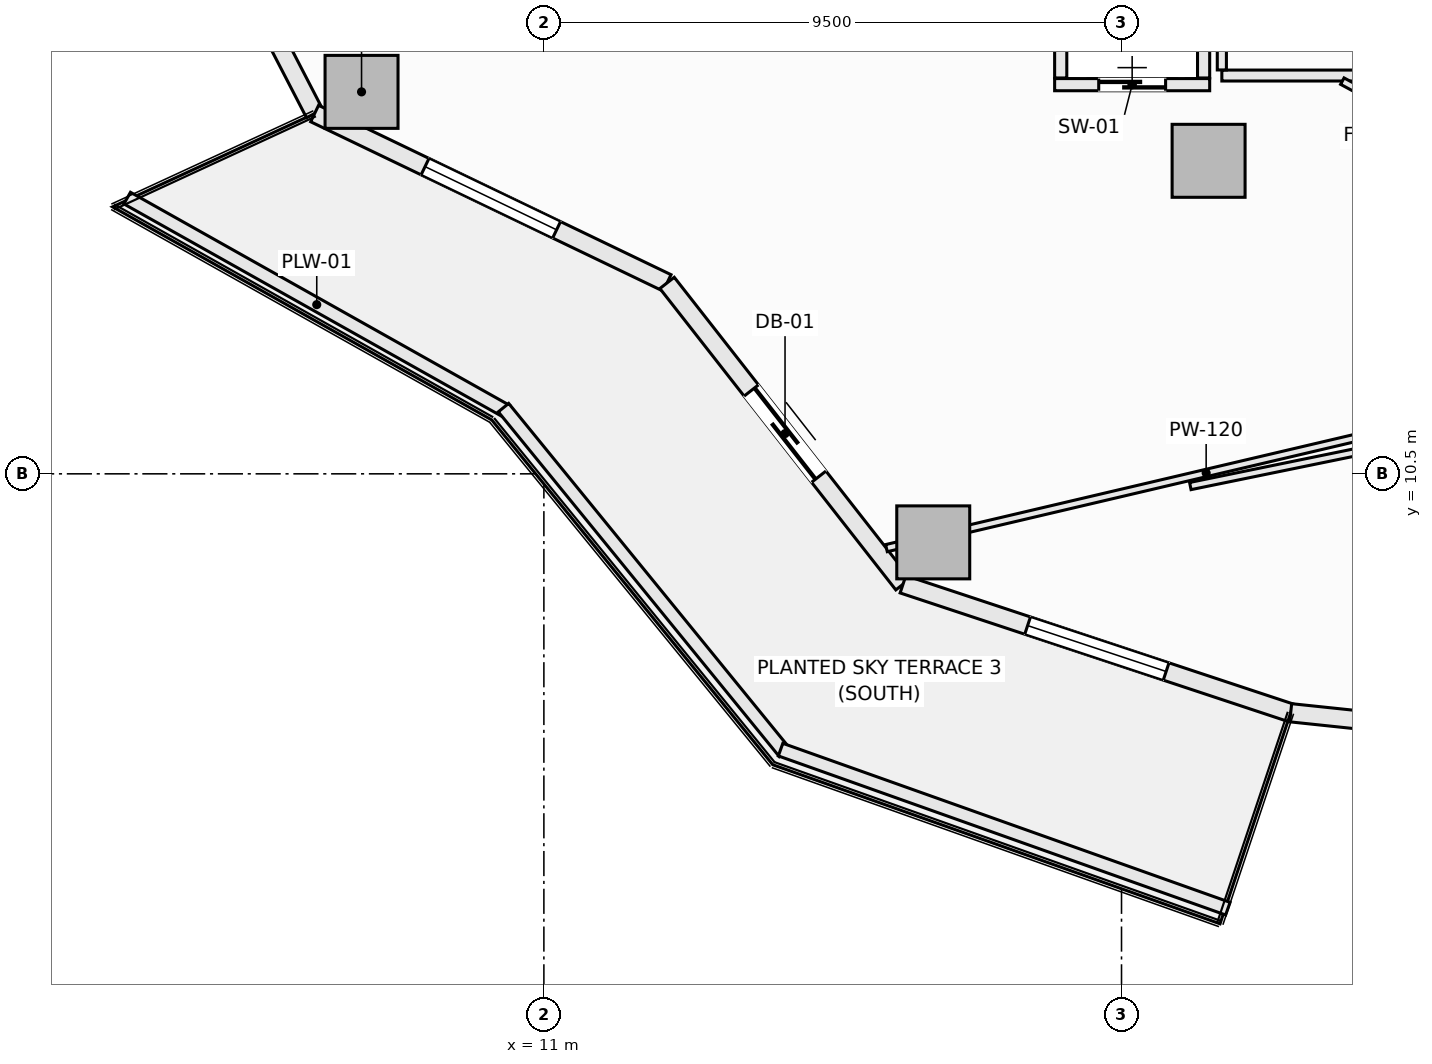
"""IFC4 building model, lengths in metres.
Left out: names, types, materials, properties, quantities, classifications, styles, units other than length and angle.
Written with IfcOpenShell. Run it as: python <this file> out.ifc"""

import sys

from ifc_helpers import new_model, si_unit, direction, frame, frame_2d, origin, origin_2d, place, context, subcontext, project, spatial, rectangle, extrude, element, fill, save


model = new_model("IFC4")
c1 = context("Model", 3, precision=1e-05, world=origin(), true_north=direction((0.0, 1.0)))
c2 = subcontext(c1, "Body", "Model", "MODEL_VIEW")
j1 = project(units=[si_unit("LENGTHUNIT", "METRE"), si_unit("PLANEANGLEUNIT", "RADIAN")], contexts=[c1])
p1 = place(None, origin())
s1 = spatial("IfcSite", under=j1, at=p1, CompositionType="ELEMENT")
p2 = place(p1, origin())
s2 = spatial("IfcBuilding", under=s1, at=p2, CompositionType="ELEMENT")
p3 = place(p2, frame((0.0, 0.0, 91.95)))
s3 = spatial("IfcBuildingStorey", under=s2, at=p3, CompositionType="ELEMENT", Elevation=91.95)
for number, where, z_axis, x_axis in (
    (1, (8.001, 16.781, -0.28), (0.0, 0.0, 1.0), (1.0, 0.0, 0.0)),
    (2, (17.404, 9.373, -0.28), (0.0, 0.0, 1.0), (1.0, 0.0, 0.0)),
    (3, (21.932, 15.648, -0.28), (0.0, 0.0, 1.0), (1.0, 0.0, 0.0)),
):
    element("IfcColumn", number, at=place(p3, frame(where, z_axis=z_axis, x_axis=x_axis)), inside=s3, PredefinedType="COLUMN", context=c2, shape_type="SweptSolid", body=[
        extrude(rectangle(XDim=1.2, YDim=1.2, at=origin_2d()), origin(), (0.0, 0.0, 1.0), 3.81),
    ])
p4 = place(p3, frame((4.588, 21.526, 0.0), z_axis=(0.0, 0.0, 1.0), x_axis=(0.459800981414, -0.888021991558, 0.0)))
e4 = element("IfcWall", 4, at=p4, inside=s3, PredefinedType="SOLIDWALL", context=c2, shape_type="SweptSolid", body=[
    extrude(rectangle(XDim=5.744, YDim=0.3, at=frame_2d((2.872, 0.0))), origin(), (0.0, 0.0, 1.0), 3.053),
])
p5 = place(p4, frame((1.672, 0.0, 0.85)))
e5 = element("IfcOpeningElement", 5, at=p5, cuts=e4, PredefinedType="OPENING", context=c2, shape_type="SweptSolid", body=[
    extrude(rectangle(XDim=2.4, YDim=1.9, at=frame_2d((1.2, 0.95))), frame((0.0, 0.16, 0.0), z_axis=(0.0, -1.0, 0.0), x_axis=(1.0, 0.0, 0.0)), (0.0, 0.0, 1.0), 0.32),
])
p6 = place(p3, frame((7.229, 16.425, 0.0), z_axis=(0.0, 0.0, 1.0), x_axis=(0.901354747727, -0.433081538224, 0.0)))
e6 = element("IfcWall", 6, at=p6, inside=s3, PredefinedType="SOLIDWALL", context=c2, shape_type="SweptSolid", body=[
    extrude(rectangle(XDim=6.431, YDim=0.3, at=frame_2d((3.215, 0.0))), origin(), (0.0, 0.0, 1.0), 3.053),
])
p7 = place(p6, frame((2.015, 0.0, 0.85)))
e7 = element("IfcOpeningElement", 7, at=p7, cuts=e6, PredefinedType="OPENING", context=c2, shape_type="SweptSolid", body=[
    extrude(rectangle(XDim=2.4, YDim=1.9, at=frame_2d((1.2, 0.95))), frame((0.0, 0.16, 0.0), z_axis=(0.0, -1.0, 0.0), x_axis=(1.0, 0.0, 0.0)), (0.0, 0.0, 1.0), 0.32),
])
p8 = place(p3, frame((13.026, 13.64, 0.0), z_axis=(0.0, 0.0, 1.0), x_axis=(0.616434798832, -0.78740595552, 0.0)))
e8 = element("IfcWall", 8, at=p8, inside=s3, PredefinedType="SOLIDWALL", context=c2, shape_type="SweptSolid", body=[
    extrude(rectangle(XDim=6.294, YDim=0.3, at=frame_2d((3.147, 0.0))), origin(), (0.0, 0.0, 1.0), 3.053),
])
p9 = place(p8, frame((2.247, 0.0, 0.0)))
e9 = element("IfcOpeningElement", 9, at=p9, cuts=e8, PredefinedType="OPENING", context=c2, shape_type="SweptSolid", body=[
    extrude(rectangle(XDim=1.8, YDim=2.25, at=frame_2d((0.9, 1.125))), frame((0.0, 0.16, 0.0), z_axis=(0.0, -1.0, 0.0), x_axis=(1.0, 0.0, 0.0)), (0.0, 0.0, 1.0), 0.32),
])
p10 = place(p3, frame((16.906, 8.684, 0.0), z_axis=(0.0, 0.0, 1.0), x_axis=(0.949245153629, -0.314537181127, 0.0)))
e10 = element("IfcWall", 10, at=p10, inside=s3, PredefinedType="SOLIDWALL", context=c2, shape_type="SweptSolid", body=[
    extrude(rectangle(XDim=6.717, YDim=0.3, at=frame_2d((3.358, 0.0))), origin(), (0.0, 0.0, 1.0), 3.053),
])
p11 = place(p10, frame((2.159, 0.0, 0.85)))
e11 = element("IfcOpeningElement", 11, at=p11, cuts=e10, PredefinedType="OPENING", context=c2, shape_type="SweptSolid", body=[
    extrude(rectangle(XDim=2.4, YDim=1.9, at=frame_2d((1.2, 0.95))), frame((0.0, 0.16, 0.0), z_axis=(0.0, -1.0, 0.0), x_axis=(1.0, 0.0, 0.0)), (0.0, 0.0, 1.0), 0.32),
])
p12 = place(p3, frame((23.282, 6.571, 0.0), z_axis=(0.0, 0.0, 1.0), x_axis=(0.994498840295, -0.104747585419, 0.0)))
e12 = element("IfcWall", 12, at=p12, inside=s3, PredefinedType="SOLIDWALL", context=c2, shape_type="SweptSolid", body=[
    extrude(rectangle(XDim=6.88, YDim=0.3, at=frame_2d((3.44, 0.0))), origin(), (0.0, 0.0, 1.0), 3.053),
])
p13 = place(p12, frame((2.24, 0.0, 0.85)))
e13 = element("IfcOpeningElement", 13, at=p13, cuts=e12, PredefinedType="OPENING", context=c2, shape_type="SweptSolid", body=[
    extrude(rectangle(XDim=2.4, YDim=1.9, at=frame_2d((1.2, 0.95))), frame((0.0, 0.16, 0.0), z_axis=(0.0, -1.0, 0.0), x_axis=(1.0, 0.0, 0.0)), (0.0, 0.0, 1.0), 0.32),
])
p14 = place(p3, frame((4.147, 15.034, 0.0), z_axis=(0.0, 0.0, 1.0), x_axis=(0.871775109335, -0.489906275468, 0.0)))
e14 = element("IfcWall", 14, at=p14, inside=s3, PredefinedType="PARAPET", context=c2, shape_type="SweptSolid", body=[
    extrude(rectangle(XDim=7.152, YDim=0.22, at=frame_2d((3.576, 0.0))), origin(), (0.0, 0.0, 1.0), 0.52),
])
p15 = place(p3, frame((10.336, 11.589, 0.0), z_axis=(0.0, 0.0, 1.0), x_axis=(0.631819273026, -0.775115737315, 0.0)))
e15 = element("IfcWall", 15, at=p15, inside=s3, PredefinedType="PARAPET", context=c2, shape_type="SweptSolid", body=[
    extrude(rectangle(XDim=7.316, YDim=0.22, at=frame_2d((3.658, 0.0))), origin(), (0.0, 0.0, 1.0), 0.52),
])
p16 = place(p3, frame((14.893, 5.965, 0.0), z_axis=(0.0, 0.0, 1.0), x_axis=(0.942203722205, -0.335040513764, 0.0)))
e16 = element("IfcWall", 16, at=p16, inside=s3, PredefinedType="PARAPET", context=c2, shape_type="SweptSolid", body=[
    extrude(rectangle(XDim=7.807, YDim=0.22, at=frame_2d((3.904, 0.0))), origin(), (0.0, 0.0, 1.0), 0.52),
])
p17 = place(p3, frame((19.4, 16.9, 0.0), z_axis=(0.0, 0.0, 1.0), x_axis=(1.0, 0.0, 0.0)))
e17 = element("IfcWall", 17, at=p17, inside=s3, PredefinedType="SOLIDWALL", context=c2, shape_type="SweptSolid", body=[
    extrude(rectangle(XDim=2.55, YDim=0.2, at=frame_2d((1.275, 0.0))), origin(), (0.0, 0.0, 1.0), 3.53),
])
p18 = place(p17, frame((0.725, 0.0, 0.0)))
e18 = element("IfcOpeningElement", 18, at=p18, cuts=e17, PredefinedType="OPENING", context=c2, shape_type="SweptSolid", body=[
    extrude(rectangle(XDim=1.1, YDim=2.2, at=frame_2d((0.55, 1.1))), frame((0.0, 0.11, 0.0), z_axis=(0.0, -1.0, 0.0), x_axis=(1.0, 0.0, 0.0)), (0.0, 0.0, 1.0), 0.22),
])
for number, where, z_axis, x_axis in (
    (19, (19.5, 17.01, 0.0), (0.0, 0.0, 1.0), (0.0, 1.0, 0.0)),
    (20, (21.85, 17.01, 0.0), (0.0, 0.0, 1.0), (0.0, 1.0, 0.0)),
):
    element("IfcWall", number, at=place(p3, frame(where, z_axis=z_axis, x_axis=x_axis)), inside=s3, PredefinedType="SOLIDWALL", context=c2, shape_type="SweptSolid", body=[
        extrude(rectangle(XDim=2.53, YDim=0.2, at=frame_2d((1.265, 0.0))), origin(), (0.0, 0.0, 1.0), 3.53),
    ])
p19 = place(p3, frame((22.15, 17.05, 0.0), z_axis=(0.0, 0.0, 1.0), x_axis=(1.0, 0.0, 0.0)))
e21 = element("IfcWall", 21, at=p19, inside=s3, PredefinedType="SOLIDWALL", context=c2, shape_type="SweptSolid", body=[
    extrude(rectangle(XDim=5.0, YDim=0.18, at=frame_2d((2.5, 0.0))), origin(), (0.0, 0.0, 1.0), 3.53),
])
p20 = place(p3, frame((22.15, 17.142, 0.0), z_axis=(0.0, 0.0, 1.0), x_axis=(0.0, 1.0, 0.0)))
e22 = element("IfcWall", 22, at=p20, inside=s3, PredefinedType="PARTITIONING", context=c2, shape_type="SweptSolid", body=[
    extrude(rectangle(XDim=2.506, YDim=0.15, at=frame_2d((1.253, 0.0))), origin(), (0.0, 0.0, 1.0), 3.53),
])
p21 = place(p3, frame((24.132, 16.958, 0.0), z_axis=(0.0, 0.0, 1.0), x_axis=(0.879874093471, -0.475206880882, 0.0)))
e23 = element("IfcWall", 23, at=p21, inside=s3, PredefinedType="PARTITIONING", context=c2, shape_type="SweptSolid", body=[
    extrude(rectangle(XDim=3.326, YDim=0.12, at=frame_2d((1.663, 0.0))), origin(), (0.0, 0.0, 1.0), 3.53),
])
p22 = place(p3, frame((16.634, 9.278, 0.0), z_axis=(0.0, 0.0, 1.0), x_axis=(0.973467827541, 0.228823925195, 0.0)))
e24 = element("IfcWall", 24, at=p22, inside=s3, PredefinedType="PARTITIONING", context=c2, shape_type="SweptSolid", body=[
    extrude(rectangle(XDim=10.803, YDim=0.12, at=frame_2d((5.401, 0.0))), origin(), (0.0, 0.0, 1.0), 3.053),
])
p23 = place(p3, frame((21.632, 10.299, 0.0), z_axis=(0.0, 0.0, 1.0), x_axis=(0.979686821634, 0.200533616924, 0.0)))
e25 = element("IfcWall", 25, at=p23, inside=s3, PredefinedType="PARTITIONING", context=c2, shape_type="SweptSolid", body=[
    extrude(rectangle(XDim=6.629, YDim=0.12, at=frame_2d((3.314, 0.0))), origin(), (0.0, 0.0, 1.0), 3.53),
])
p24 = place(p7, origin())
e26 = element("IfcWindow", 26, at=p24, inside=s3, PartitioningType="SINGLE_PANEL", PredefinedType="WINDOW", context=c2, shape_type="SweptSolid", body=[
    extrude(rectangle(XDim=2.4, YDim=1.9, at=frame_2d((1.2, 0.95))), frame((0.0, 0.03, 0.0), z_axis=(0.0, -1.0, 0.0), x_axis=(1.0, 0.0, 0.0)), (0.0, 0.0, 1.0), 0.06),
])
fill(e7, e26)
p25 = place(p9, frame((1.8, 0.0, 0.0), z_axis=(0.0, 0.0, 1.0), x_axis=(-1.0, 0.0, 0.0)))
e27 = element("IfcDoor", 27, at=p25, inside=s3, OperationType="SLIDING_TO_LEFT", PredefinedType="DOOR", context=c2, shape_type="SweptSolid", body=[
    extrude(rectangle(XDim=1.8, YDim=2.25, at=frame_2d((0.9, 1.125))), frame((0.0, 0.025, 0.0), z_axis=(0.0, -1.0, 0.0), x_axis=(1.0, 0.0, 0.0)), (0.0, 0.0, 1.0), 0.05),
])
fill(e9, e27)
p26 = place(p11, origin())
e28 = element("IfcWindow", 28, at=p26, inside=s3, PartitioningType="SINGLE_PANEL", PredefinedType="WINDOW", context=c2, shape_type="SweptSolid", body=[
    extrude(rectangle(XDim=2.4, YDim=1.9, at=frame_2d((1.2, 0.95))), frame((0.0, 0.03, 0.0), z_axis=(0.0, -1.0, 0.0), x_axis=(1.0, 0.0, 0.0)), (0.0, 0.0, 1.0), 0.06),
])
fill(e11, e28)
p27 = place(p18, origin())
e29 = element("IfcDoor", 29, at=p27, inside=s3, OperationType="SLIDING_TO_LEFT", PredefinedType="DOOR", context=c2, shape_type="SweptSolid", body=[
    extrude(rectangle(XDim=1.1, YDim=2.2, at=frame_2d((0.55, 1.1))), frame((0.0, 0.025, 0.0), z_axis=(0.0, -1.0, 0.0), x_axis=(1.0, 0.0, 0.0)), (0.0, 0.0, 1.0), 0.05),
])
fill(e18, e29)
save(model, sys.argv[1])
